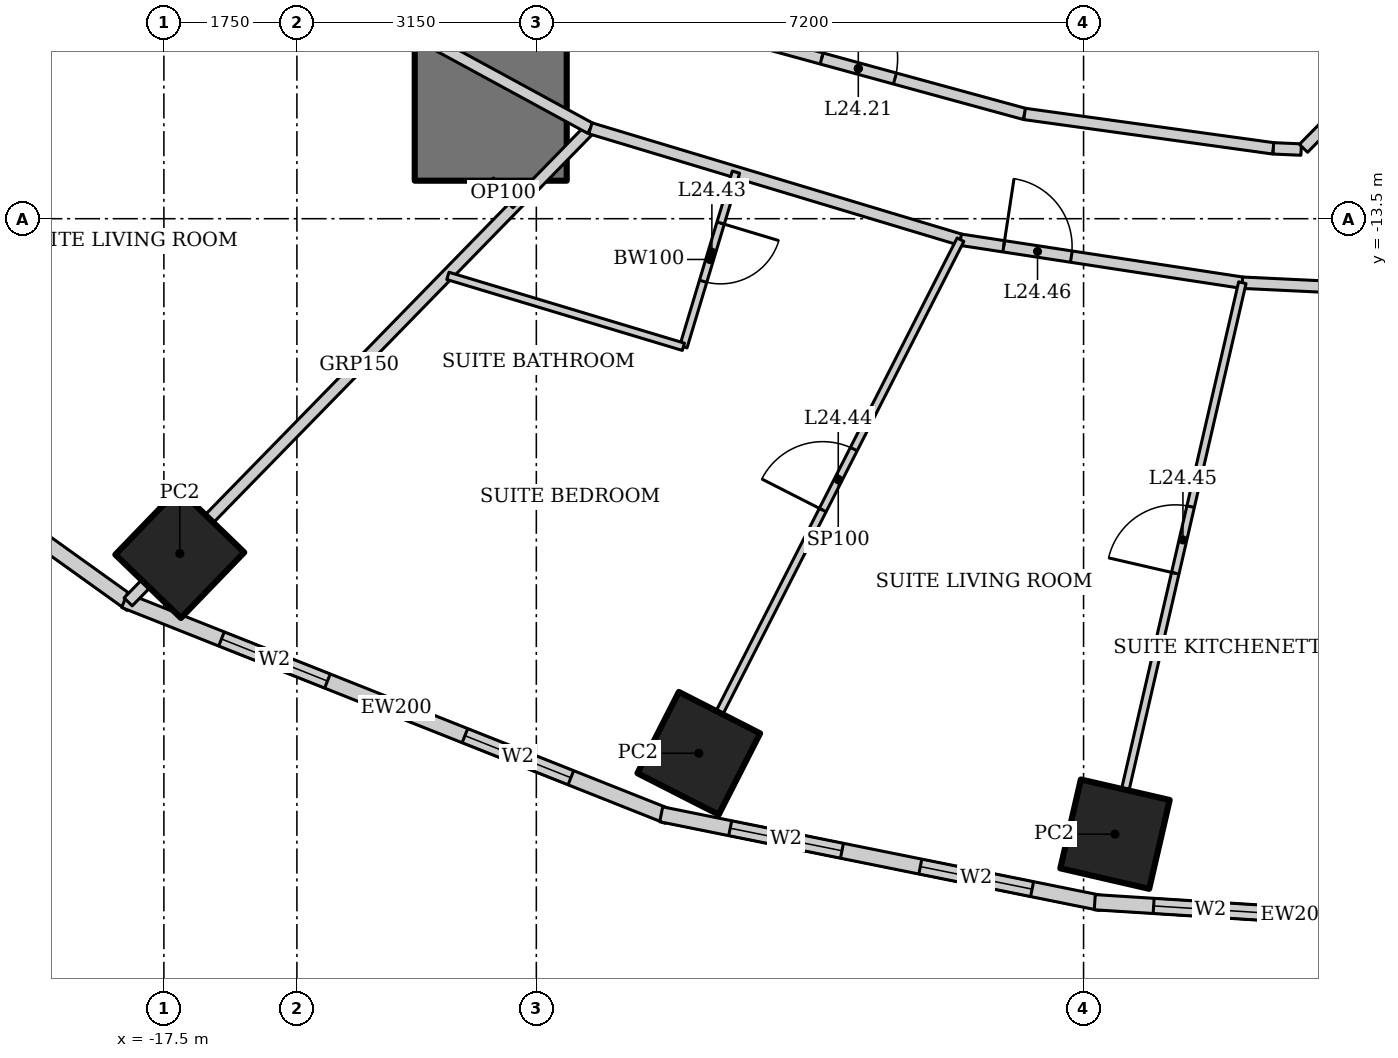
"""IFC4 building model, lengths in metres.
Left out: names, types, materials, properties, quantities, classifications, styles, units other than length and angle.
Written with IfcOpenShell. Run it as: python <this file> out.ifc"""

import sys

from ifc_helpers import new_model, si_unit, direction, frame, frame_2d, origin, origin_2d, place, context, subcontext, project, spatial, rectangle, hollow_rectangle, extrude, element, fill, save


model = new_model("IFC4")
c1 = context("Model", 3, precision=1e-05, world=origin(), true_north=direction((0.0, 1.0)))
c2 = subcontext(c1, "Body", "Model", "MODEL_VIEW")
j1 = project(units=[si_unit("LENGTHUNIT", "METRE"), si_unit("PLANEANGLEUNIT", "RADIAN")], contexts=[c1])
p1 = place(None, origin())
s1 = spatial("IfcSite", under=j1, at=p1, CompositionType="ELEMENT")
p2 = place(p1, origin())
s2 = spatial("IfcBuilding", under=s1, at=p2, CompositionType="ELEMENT")
p3 = place(p2, frame((0.0, 0.0, 101.8)))
s3 = spatial("IfcBuildingStorey", under=s2, at=p3, CompositionType="ELEMENT", Elevation=101.8)
for number, where, z_axis, x_axis in (
    (1, (-17.291, -17.905, 0.0), (0.0, 0.0, 1.0), (0.695, 0.719, 0.0)),
    (2, (-10.463, -20.534, 0.0), (0.0, 0.0, 1.0), (0.454, 0.891, 0.0)),
    (3, (-4.986, -21.598, 0.0), (0.0, 0.0, 1.0), (0.225, 0.974, 0.0)),
):
    element("IfcColumn", number, at=place(p3, frame(where, z_axis=z_axis, x_axis=x_axis)), inside=s3, PredefinedType="COLUMN", context=c2, shape_type="SweptSolid", body=[
        extrude(hollow_rectangle(XDim=1.2, YDim=1.2, WallThickness=0.1, at=origin_2d()), origin(), (0.0, 0.0, 1.0), 2.28),
    ])
p4 = place(p3, frame((-13.2, 13.0, 0.0), z_axis=(0.0, 0.0, 1.0), x_axis=(0.0, -1.0, 0.0)))
e4 = element("IfcWall", 4, at=p4, inside=s3, PredefinedType="SHEAR", context=c2, shape_type="SweptSolid", body=[
    extrude(rectangle(XDim=26.0, YDim=2.0, at=frame_2d((13.0, 0.0))), origin(), (0.0, 0.0, 1.0), 3.6),
])
p5 = place(p4, frame((12.1, 0.0, 0.0)))
e5 = element("IfcOpeningElement", 5, at=p5, cuts=e4, PredefinedType="OPENING", context=c2, shape_type="SweptSolid", body=[
    extrude(rectangle(XDim=1.8, YDim=2.1, at=frame_2d((0.9, 1.05))), frame((0.0, 1.01, 0.0), z_axis=(0.0, -1.0, 0.0), x_axis=(1.0, 0.0, 0.0)), (0.0, 0.0, 1.0), 2.02),
])
p6 = place(p3, frame((-24.482, -13.875, 0.0), z_axis=(0.0, 0.0, 1.0), x_axis=(0.812791321576, -0.582554948112, 0.0)))
e6 = element("IfcWall", 6, at=p6, inside=s3, PredefinedType="SOLIDWALL", context=c2, shape_type="SweptSolid", body=[
    extrude(rectangle(XDim=8.063, YDim=0.2, at=frame_2d((4.032, 0.0))), origin(), (0.0, 0.0, 1.0), 3.4),
])
p7 = place(p6, frame((1.466, 0.0, 0.5)))
e7 = element("IfcOpeningElement", 7, at=p7, cuts=e6, PredefinedType="OPENING", context=c2, shape_type="SweptSolid", body=[
    extrude(rectangle(XDim=1.5, YDim=2.2, at=frame_2d((0.75, 1.1))), frame((0.0, 0.11, 0.0), z_axis=(0.0, -1.0, 0.0), x_axis=(1.0, 0.0, 0.0)), (0.0, 0.0, 1.0), 0.22),
])
p8 = place(p6, frame((5.097, 0.0, 0.5)))
e8 = element("IfcOpeningElement", 8, at=p8, cuts=e6, PredefinedType="OPENING", context=c2, shape_type="SweptSolid", body=[
    extrude(rectangle(XDim=1.5, YDim=2.2, at=frame_2d((0.75, 1.1))), frame((0.0, 0.11, 0.0), z_axis=(0.0, -1.0, 0.0), x_axis=(1.0, 0.0, 0.0)), (0.0, 0.0, 1.0), 0.22),
])
p9 = place(p3, frame((-18.018, -18.523, 0.0), z_axis=(0.0, 0.0, 1.0), x_axis=(0.929358351251, -0.369178892895, 0.0)))
e9 = element("IfcWall", 9, at=p9, inside=s3, PredefinedType="SOLIDWALL", context=c2, shape_type="SweptSolid", body=[
    extrude(rectangle(XDim=7.692, YDim=0.2, at=frame_2d((3.846, 0.0))), origin(), (0.0, 0.0, 1.0), 3.4),
])
p10 = place(p9, frame((1.373, 0.0, 0.5)))
e10 = element("IfcOpeningElement", 10, at=p10, cuts=e9, PredefinedType="OPENING", context=c2, shape_type="SweptSolid", body=[
    extrude(rectangle(XDim=1.5, YDim=2.2, at=frame_2d((0.75, 1.1))), frame((0.0, 0.11, 0.0), z_axis=(0.0, -1.0, 0.0), x_axis=(1.0, 0.0, 0.0)), (0.0, 0.0, 1.0), 0.22),
])
p11 = place(p9, frame((4.819, 0.0, 0.5)))
e11 = element("IfcOpeningElement", 11, at=p11, cuts=e9, PredefinedType="OPENING", context=c2, shape_type="SweptSolid", body=[
    extrude(rectangle(XDim=1.5, YDim=2.2, at=frame_2d((0.75, 1.1))), frame((0.0, 0.11, 0.0), z_axis=(0.0, -1.0, 0.0), x_axis=(1.0, 0.0, 0.0)), (0.0, 0.0, 1.0), 0.22),
])
p12 = place(p3, frame((-10.957, -21.337, 0.0), z_axis=(0.0, 0.0, 1.0), x_axis=(0.980251657452, -0.197754110105, 0.0)))
e12 = element("IfcWall", 12, at=p12, inside=s3, PredefinedType="SOLIDWALL", context=c2, shape_type="SweptSolid", body=[
    extrude(rectangle(XDim=5.904, YDim=0.2, at=frame_2d((2.952, 0.0))), origin(), (0.0, 0.0, 1.0), 3.4),
])
p13 = place(p12, frame((0.926, 0.0, 0.5)))
e13 = element("IfcOpeningElement", 13, at=p13, cuts=e12, PredefinedType="OPENING", context=c2, shape_type="SweptSolid", body=[
    extrude(rectangle(XDim=1.5, YDim=2.2, at=frame_2d((0.75, 1.1))), frame((0.0, 0.11, 0.0), z_axis=(0.0, -1.0, 0.0), x_axis=(1.0, 0.0, 0.0)), (0.0, 0.0, 1.0), 0.22),
])
p14 = place(p12, frame((3.478, 0.0, 0.5)))
e14 = element("IfcOpeningElement", 14, at=p14, cuts=e12, PredefinedType="OPENING", context=c2, shape_type="SweptSolid", body=[
    extrude(rectangle(XDim=1.5, YDim=2.2, at=frame_2d((0.75, 1.1))), frame((0.0, 0.11, 0.0), z_axis=(0.0, -1.0, 0.0), x_axis=(1.0, 0.0, 0.0)), (0.0, 0.0, 1.0), 0.22),
])
p15 = place(p3, frame((-5.253, -22.493, 0.0), z_axis=(0.0, 0.0, 1.0), x_axis=(0.998018582375, -0.062919863585, 0.0)))
e15 = element("IfcWall", 15, at=p15, inside=s3, PredefinedType="SOLIDWALL", context=c2, shape_type="SweptSolid", body=[
    extrude(rectangle(XDim=5.304, YDim=0.2, at=frame_2d((2.652, 0.0))), origin(), (0.0, 0.0, 1.0), 3.4),
])
p16 = place(p15, frame((0.776, 0.0, 0.5)))
e16 = element("IfcOpeningElement", 16, at=p16, cuts=e15, PredefinedType="OPENING", context=c2, shape_type="SweptSolid", body=[
    extrude(rectangle(XDim=1.5, YDim=2.2, at=frame_2d((0.75, 1.1))), frame((0.0, 0.11, 0.0), z_axis=(0.0, -1.0, 0.0), x_axis=(1.0, 0.0, 0.0)), (0.0, 0.0, 1.0), 0.22),
])
p17 = place(p15, frame((3.028, 0.0, 0.5)))
e17 = element("IfcOpeningElement", 17, at=p17, cuts=e15, PredefinedType="OPENING", context=c2, shape_type="SweptSolid", body=[
    extrude(rectangle(XDim=1.5, YDim=2.2, at=frame_2d((0.75, 1.1))), frame((0.0, 0.11, 0.0), z_axis=(0.0, -1.0, 0.0), x_axis=(1.0, 0.0, 0.0)), (0.0, 0.0, 1.0), 0.22),
])
p18 = place(p3, frame((-17.97, -18.542, 0.0), z_axis=(0.0, 0.0, 1.0), x_axis=(0.698503223934, 0.715606907564, 0.0)))
e18 = element("IfcWall", 18, at=p18, inside=s3, PredefinedType="PARTITIONING", context=c2, shape_type="SweptSolid", body=[
    extrude(rectangle(XDim=8.707, YDim=0.15, at=frame_2d((4.354, 0.0))), origin(), (0.0, 0.0, 1.0), 2.463),
])
p19 = place(p3, frame((-16.835, -9.62, 0.0), z_axis=(0.0, 0.0, 1.0), x_axis=(0.878450059298, -0.477834169267, 0.0)))
e19 = element("IfcWall", 19, at=p19, inside=s3, PredefinedType="PARTITIONING", context=c2, shape_type="SweptSolid", body=[
    extrude(rectangle(XDim=5.631, YDim=0.15, at=frame_2d((2.815, 0.0))), origin(), (0.0, 0.0, 1.0), 3.4),
])
p20 = place(p3, frame((-11.888, -12.311, 0.0), z_axis=(0.0, 0.0, 1.0), x_axis=(0.957564241242, -0.288219922793, 0.0)))
e20 = element("IfcWall", 20, at=p20, inside=s3, PredefinedType="PARTITIONING", context=c2, shape_type="SweptSolid", body=[
    extrude(rectangle(XDim=5.085, YDim=0.15, at=frame_2d((2.542, 0.0))), origin(), (0.0, 0.0, 1.0), 3.4),
])
p21 = place(p3, frame((-7.019, -13.776, 0.0), z_axis=(0.0, 0.0, 1.0), x_axis=(0.988564270062, -0.150800145746, 0.0)))
e21 = element("IfcWall", 21, at=p21, inside=s3, PredefinedType="PARTITIONING", context=c2, shape_type="SweptSolid", body=[
    extrude(rectangle(XDim=3.751, YDim=0.15, at=frame_2d((1.875, 0.0))), origin(), (0.0, 0.0, 1.0), 3.4),
])
p22 = place(p21, frame((0.575, 0.0, 0.0)))
e22 = element("IfcOpeningElement", 22, at=p22, cuts=e21, PredefinedType="OPENING", context=c2, shape_type="SweptSolid", body=[
    extrude(rectangle(XDim=0.9, YDim=2.1, at=frame_2d((0.45, 1.05))), frame((0.0, 0.085, 0.0), z_axis=(0.0, -1.0, 0.0), x_axis=(1.0, 0.0, 0.0)), (0.0, 0.0, 1.0), 0.17),
])
p23 = place(p3, frame((-3.311, -14.342, 0.0), z_axis=(0.0, 0.0, 1.0), x_axis=(0.998863968075, -0.047652631422, 0.0)))
e23 = element("IfcWall", 23, at=p23, inside=s3, PredefinedType="PARTITIONING", context=c2, shape_type="SweptSolid", body=[
    extrude(rectangle(XDim=3.315, YDim=0.15, at=frame_2d((1.657, 0.0))), origin(), (0.0, 0.0, 1.0), 3.4),
])
p24 = place(p3, frame((-10.551, -10.926, 0.0), z_axis=(0.0, 0.0, 1.0), x_axis=(0.964644466646, -0.263554648923, 0.0)))
e24 = element("IfcWall", 24, at=p24, inside=s3, PredefinedType="PARTITIONING", context=c2, shape_type="SweptSolid", body=[
    extrude(rectangle(XDim=4.535, YDim=0.15, at=frame_2d((2.268, 0.0))), origin(), (0.0, 0.0, 1.0), 3.4),
])
p25 = place(p24, frame((1.768, 0.0, 0.0)))
e25 = element("IfcOpeningElement", 25, at=p25, cuts=e24, PredefinedType="OPENING", context=c2, shape_type="SweptSolid", body=[
    extrude(rectangle(XDim=1.0, YDim=2.1, at=frame_2d((0.5, 1.05))), frame((0.0, 0.085, 0.0), z_axis=(0.0, -1.0, 0.0), x_axis=(1.0, 0.0, 0.0)), (0.0, 0.0, 1.0), 0.17),
])
p26 = place(p3, frame((-6.176, -12.122, 0.0), z_axis=(0.0, 0.0, 1.0), x_axis=(0.990563451353, -0.137054911782, 0.0)))
e26 = element("IfcWall", 26, at=p26, inside=s3, PredefinedType="PARTITIONING", context=c2, shape_type="SweptSolid", body=[
    extrude(rectangle(XDim=3.304, YDim=0.15, at=frame_2d((1.652, 0.0))), origin(), (0.0, 0.0, 1.0), 3.4),
])
p27 = place(p3, frame((-23.171, -13.24, 0.0), z_axis=(0.0, 0.0, 1.0), x_axis=(0.868253436131, 0.496120923412, 0.0)))
e27 = element("IfcWall", 27, at=p27, inside=s3, PredefinedType="PARTITIONING", context=c2, shape_type="SweptSolid", body=[
    extrude(rectangle(XDim=7.297, YDim=0.1, at=frame_2d((3.649, 0.0))), origin(), (0.0, 0.0, 1.0), 2.2),
])
p28 = place(p27, frame((3.198, 0.0, 0.0)))
e28 = element("IfcOpeningElement", 28, at=p28, cuts=e27, PredefinedType="OPENING", context=c2, shape_type="SweptSolid", body=[
    extrude(rectangle(XDim=0.9, YDim=2.1, at=frame_2d((0.45, 1.05))), frame((0.0, 0.06, 0.0), z_axis=(0.0, -1.0, 0.0), x_axis=(1.0, 0.0, 0.0)), (0.0, 0.0, 1.0), 0.12),
])
p29 = place(p3, frame((-9.973, -12.887, 0.0), z_axis=(0.0, 0.0, 1.0), x_axis=(-0.288290341405, -0.957543042924, 0.0)))
e29 = element("IfcWall", 29, at=p29, inside=s3, PredefinedType="PARTITIONING", context=c2, shape_type="SweptSolid", body=[
    extrude(rectangle(XDim=2.4, YDim=0.1, at=frame_2d((1.2, 0.0))), origin(), (0.0, 0.0, 1.0), 3.4),
])
p30 = place(p29, frame((0.7, 0.0, 0.0)))
e30 = element("IfcOpeningElement", 30, at=p30, cuts=e29, PredefinedType="OPENING", context=c2, shape_type="SweptSolid", body=[
    extrude(rectangle(XDim=0.8, YDim=2.1, at=frame_2d((0.4, 1.05))), frame((0.0, 0.06, 0.0), z_axis=(0.0, -1.0, 0.0), x_axis=(1.0, 0.0, 0.0)), (0.0, 0.0, 1.0), 0.12),
])
p31 = place(p3, frame((-10.665, -15.185, 0.0), z_axis=(0.0, 0.0, 1.0), x_axis=(-0.957568413147, 0.288206061946, 0.0)))
e31 = element("IfcWall", 31, at=p31, inside=s3, PredefinedType="PARTITIONING", context=c2, shape_type="SweptSolid", body=[
    extrude(rectangle(XDim=3.236, YDim=0.1, at=frame_2d((1.618, 0.0))), origin(), (0.0, 0.0, 1.0), 3.4),
])
p32 = place(p3, frame((-10.236, -20.088, 0.0), z_axis=(0.0, 0.0, 1.0), x_axis=(0.454010445571, 0.890996360998, 0.0)))
e32 = element("IfcWall", 32, at=p32, inside=s3, PredefinedType="PARTITIONING", context=c2, shape_type="SweptSolid", body=[
    extrude(rectangle(XDim=7.084, YDim=0.1, at=frame_2d((3.542, 0.0))), origin(), (0.0, 0.0, 1.0), 2.463),
])
p33 = place(p32, frame((3.092, 0.0, 0.0)))
e33 = element("IfcOpeningElement", 33, at=p33, cuts=e32, PredefinedType="OPENING", context=c2, shape_type="SweptSolid", body=[
    extrude(rectangle(XDim=0.9, YDim=2.1, at=frame_2d((0.45, 1.05))), frame((0.0, 0.06, 0.0), z_axis=(0.0, -1.0, 0.0), x_axis=(1.0, 0.0, 0.0)), (0.0, 0.0, 1.0), 0.12),
])
p34 = place(p3, frame((-4.874, -21.111, 0.0), z_axis=(0.0, 0.0, 1.0), x_axis=(0.224957040173, 0.974368682828, 0.0)))
e34 = element("IfcWall", 34, at=p34, inside=s3, PredefinedType="PARTITIONING", context=c2, shape_type="SweptSolid", body=[
    extrude(rectangle(XDim=6.947, YDim=0.1, at=frame_2d((3.473, 0.0))), origin(), (0.0, 0.0, 1.0), 2.554),
])
p35 = place(p34, frame((3.023, 0.0, 0.0)))
e35 = element("IfcOpeningElement", 35, at=p35, cuts=e34, PredefinedType="OPENING", context=c2, shape_type="SweptSolid", body=[
    extrude(rectangle(XDim=0.9, YDim=2.1, at=frame_2d((0.45, 1.05))), frame((0.0, 0.06, 0.0), z_axis=(0.0, -1.0, 0.0), x_axis=(1.0, 0.0, 0.0)), (0.0, 0.0, 1.0), 0.12),
])
p36 = place(p3, frame((-13.2, -13.0, 0.0), z_axis=(0.0, 0.0, 1.0), x_axis=(0.715599628005, -0.698510681664, 0.0)))
e36 = element("IfcWall", 36, at=p36, inside=s3, PredefinedType="PARTITIONING", context=c2, shape_type="SweptSolid", body=[
    extrude(rectangle(XDim=0.457, YDim=0.1, at=frame_2d((0.229, 0.0))), origin(), (0.0, 0.0, 1.0), 3.4),
])
p37 = place(p3, frame((-2.903, -12.574, 0.0), z_axis=(0.0, 0.0, 1.0), x_axis=(0.999061181733, -0.04332153223, 0.0)))
e37 = element("IfcWall", 37, at=p37, inside=s3, PredefinedType="PARTITIONING", context=c2, shape_type="SweptSolid", body=[
    extrude(rectangle(XDim=0.366, YDim=0.15, at=frame_2d((0.183, 0.0))), origin(), (0.0, 0.0, 1.0), 3.4),
])
p38 = place(p3, frame((-2.506, -12.574, 0.0), z_axis=(0.0, 0.0, 1.0), x_axis=(0.701622806479, 0.712548550927, 0.0)))
e38 = element("IfcWall", 38, at=p38, inside=s3, PredefinedType="PARTITIONING", context=c2, shape_type="SweptSolid", body=[
    extrude(rectangle(XDim=1.542, YDim=0.15, at=frame_2d((0.771, 0.0))), origin(), (0.0, 0.0, 1.0), 3.4),
])
p39 = place(p10, origin())
e39 = element("IfcWindow", 39, at=p39, inside=s3, PartitioningType="SINGLE_PANEL", PredefinedType="WINDOW", context=c2, shape_type="SweptSolid", body=[
    extrude(rectangle(XDim=1.5, YDim=2.2, at=frame_2d((0.75, 1.1))), frame((0.0, 0.03, 0.0), z_axis=(0.0, -1.0, 0.0), x_axis=(1.0, 0.0, 0.0)), (0.0, 0.0, 1.0), 0.06),
])
fill(e10, e39)
p40 = place(p11, origin())
e40 = element("IfcWindow", 40, at=p40, inside=s3, PartitioningType="SINGLE_PANEL", PredefinedType="WINDOW", context=c2, shape_type="SweptSolid", body=[
    extrude(rectangle(XDim=1.5, YDim=2.2, at=frame_2d((0.75, 1.1))), frame((0.0, 0.03, 0.0), z_axis=(0.0, -1.0, 0.0), x_axis=(1.0, 0.0, 0.0)), (0.0, 0.0, 1.0), 0.06),
])
fill(e11, e40)
p41 = place(p13, origin())
e41 = element("IfcWindow", 41, at=p41, inside=s3, PartitioningType="SINGLE_PANEL", PredefinedType="WINDOW", context=c2, shape_type="SweptSolid", body=[
    extrude(rectangle(XDim=1.5, YDim=2.2, at=frame_2d((0.75, 1.1))), frame((0.0, 0.03, 0.0), z_axis=(0.0, -1.0, 0.0), x_axis=(1.0, 0.0, 0.0)), (0.0, 0.0, 1.0), 0.06),
])
fill(e13, e41)
p42 = place(p14, origin())
e42 = element("IfcWindow", 42, at=p42, inside=s3, PartitioningType="SINGLE_PANEL", PredefinedType="WINDOW", context=c2, shape_type="SweptSolid", body=[
    extrude(rectangle(XDim=1.5, YDim=2.2, at=frame_2d((0.75, 1.1))), frame((0.0, 0.03, 0.0), z_axis=(0.0, -1.0, 0.0), x_axis=(1.0, 0.0, 0.0)), (0.0, 0.0, 1.0), 0.06),
])
fill(e14, e42)
p43 = place(p16, origin())
e43 = element("IfcWindow", 43, at=p43, inside=s3, PartitioningType="SINGLE_PANEL", PredefinedType="WINDOW", context=c2, shape_type="SweptSolid", body=[
    extrude(rectangle(XDim=1.5, YDim=2.2, at=frame_2d((0.75, 1.1))), frame((0.0, 0.03, 0.0), z_axis=(0.0, -1.0, 0.0), x_axis=(1.0, 0.0, 0.0)), (0.0, 0.0, 1.0), 0.06),
])
fill(e16, e43)
p44 = place(p25, origin())
e44 = element("IfcDoor", 44, at=p44, inside=s3, OperationType="SINGLE_SWING_LEFT", PredefinedType="DOOR", context=c2, shape_type="SweptSolid", body=[
    extrude(rectangle(XDim=1.0, YDim=2.1, at=frame_2d((0.5, 1.05))), frame((0.0, 0.025, 0.0), z_axis=(0.0, -1.0, 0.0), x_axis=(1.0, 0.0, 0.0)), (0.0, 0.0, 1.0), 0.05),
])
fill(e25, e44)
p45 = place(p30, origin())
e45 = element("IfcDoor", 45, at=p45, inside=s3, OperationType="SINGLE_SWING_LEFT", PredefinedType="DOOR", context=c2, shape_type="SweptSolid", body=[
    extrude(rectangle(XDim=0.8, YDim=2.1, at=frame_2d((0.4, 1.05))), frame((0.0, 0.025, 0.0), z_axis=(0.0, -1.0, 0.0), x_axis=(1.0, 0.0, 0.0)), (0.0, 0.0, 1.0), 0.05),
])
fill(e30, e45)
p46 = place(p33, origin())
e46 = element("IfcDoor", 46, at=p46, inside=s3, OperationType="SINGLE_SWING_LEFT", PredefinedType="DOOR", context=c2, shape_type="SweptSolid", body=[
    extrude(rectangle(XDim=0.9, YDim=2.1, at=frame_2d((0.45, 1.05))), frame((0.0, 0.025, 0.0), z_axis=(0.0, -1.0, 0.0), x_axis=(1.0, 0.0, 0.0)), (0.0, 0.0, 1.0), 0.05),
])
fill(e33, e46)
p47 = place(p35, origin())
e47 = element("IfcDoor", 47, at=p47, inside=s3, OperationType="SINGLE_SWING_LEFT", PredefinedType="DOOR", context=c2, shape_type="SweptSolid", body=[
    extrude(rectangle(XDim=0.9, YDim=2.1, at=frame_2d((0.45, 1.05))), frame((0.0, 0.025, 0.0), z_axis=(0.0, -1.0, 0.0), x_axis=(1.0, 0.0, 0.0)), (0.0, 0.0, 1.0), 0.05),
])
fill(e35, e47)
p48 = place(p22, origin())
e48 = element("IfcDoor", 48, at=p48, inside=s3, OperationType="SINGLE_SWING_LEFT", PredefinedType="DOOR", context=c2, shape_type="SweptSolid", body=[
    extrude(rectangle(XDim=0.9, YDim=2.1, at=frame_2d((0.45, 1.05))), frame((0.0, 0.025, 0.0), z_axis=(0.0, -1.0, 0.0), x_axis=(1.0, 0.0, 0.0)), (0.0, 0.0, 1.0), 0.05),
])
fill(e22, e48)
save(model, sys.argv[1])
